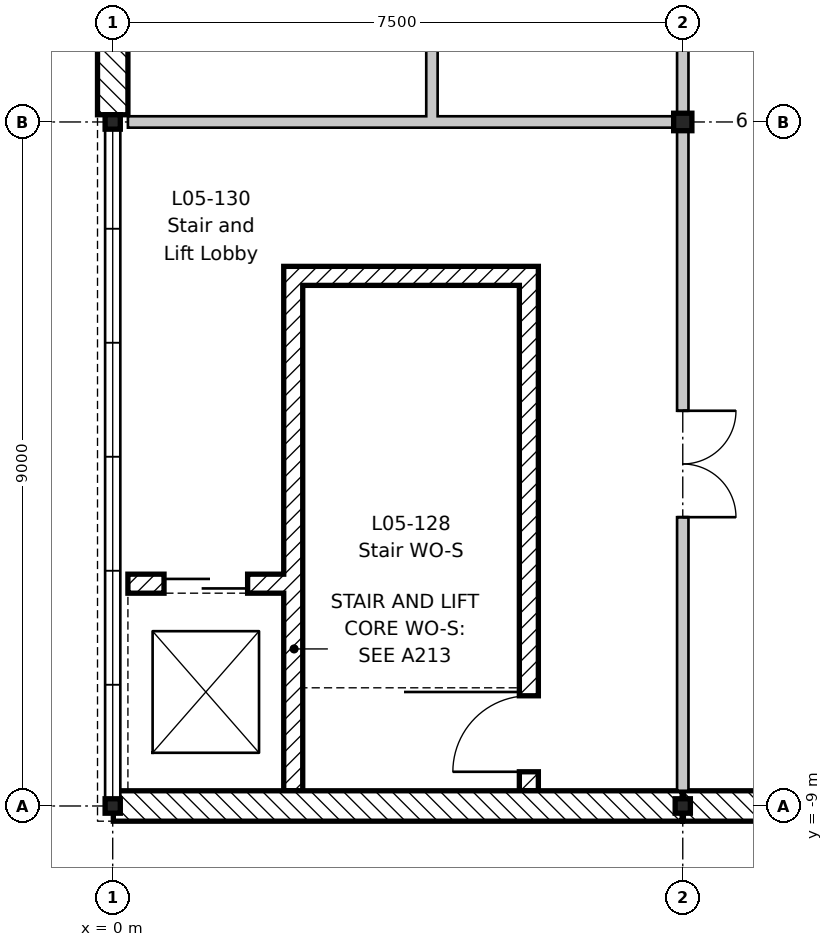
"""IFC4 building model, lengths in metres.
Left out: names, types, materials, properties, quantities, classifications, styles, units other than length and angle.
Written with IfcOpenShell. Run it as: python <this file> out.ifc"""

import sys

from ifc_helpers import new_model, si_unit, direction, frame, frame_2d, origin, origin_2d, place, context, subcontext, project, spatial, rectangle, i_section, extrude, element, fill, save


model = new_model("IFC4")
c1 = context("Model", 3, precision=1e-05, world=origin(), true_north=direction((0.0, 1.0)))
c2 = subcontext(c1, "Body", "Model", "MODEL_VIEW")
j1 = project(units=[si_unit("LENGTHUNIT", "METRE"), si_unit("PLANEANGLEUNIT", "RADIAN")], contexts=[c1])
p1 = place(None, origin())
s1 = spatial("IfcSite", under=j1, at=p1, CompositionType="ELEMENT")
p2 = place(p1, origin())
s2 = spatial("IfcBuilding", under=s1, at=p2, CompositionType="ELEMENT")
p3 = place(p2, frame((0.0, 0.0, 22.8)))
s3 = spatial("IfcBuildingStorey", under=s2, at=p3, CompositionType="ELEMENT", Elevation=22.8)
for number, where, z_axis, x_axis in (
    (1, (0.0, -9.0, -0.2), (0.0, 0.0, 1.0), (1.0, 0.0, 0.0)),
    (2, (0.0, 0.0, -0.2), (0.0, 0.0, 1.0), (1.0, 0.0, 0.0)),
    (3, (7.5, -9.0, -0.2), (0.0, 0.0, 1.0), (1.0, 0.0, 0.0)),
):
    element("IfcColumn", number, at=place(p3, frame(where, z_axis=z_axis, x_axis=x_axis)), inside=s3, PredefinedType="COLUMN", context=c2, shape_type="SweptSolid", body=[
        extrude(i_section(OverallWidth=0.2, OverallDepth=0.19, WebThickness=0.007, FlangeThickness=0.01, FilletRadius=0.018, at=origin_2d()), origin(), (0.0, 0.0, 1.0), 4.15),
    ])
p4 = place(p3, frame((7.5, 0.0, -0.2), z_axis=(0.0, 0.0, 1.0), x_axis=(1.0, 0.0, 0.0)))
e4 = element("IfcColumn", 4, at=p4, inside=s3, PredefinedType="COLUMN", context=c2, shape_type="SweptSolid", body=[
    extrude(i_section(OverallWidth=0.24, OverallDepth=0.23, WebThickness=0.008, FlangeThickness=0.012, FilletRadius=0.021, at=origin_2d()), origin(), (0.0, 0.0, 1.0), 4.15),
])
p5 = place(p3, frame((2.375, -8.8, 0.0), z_axis=(0.0, 0.0, 1.0), x_axis=(0.0, 1.0, 0.0)))
e5 = element("IfcWall", 5, at=p5, inside=s3, PredefinedType="SHEAR", context=c2, shape_type="SweptSolid", body=[
    extrude(rectangle(XDim=6.9, YDim=0.25, at=frame_2d((3.45, 0.0))), origin(), (0.0, 0.0, 1.0), 3.95),
])
p6 = place(p3, frame((5.475, -8.8, 0.0), z_axis=(0.0, 0.0, 1.0), x_axis=(0.0, 1.0, 0.0)))
e6 = element("IfcWall", 6, at=p6, inside=s3, PredefinedType="SHEAR", context=c2, shape_type="SweptSolid", body=[
    extrude(rectangle(XDim=6.9, YDim=0.25, at=frame_2d((3.45, 0.0))), origin(), (0.0, 0.0, 1.0), 3.95),
])
p7 = place(p6, frame((0.25, 0.0, 0.0)))
e7 = element("IfcOpeningElement", 7, at=p7, cuts=e6, PredefinedType="OPENING", context=c2, shape_type="SweptSolid", body=[
    extrude(rectangle(XDim=1.0, YDim=2.1, at=frame_2d((0.5, 1.05))), frame((0.0, 0.135, 0.0), z_axis=(0.0, -1.0, 0.0), x_axis=(1.0, 0.0, 0.0)), (0.0, 0.0, 1.0), 0.27),
])
p8 = place(p3, frame((2.5, -2.025, 0.0), z_axis=(0.0, 0.0, 1.0), x_axis=(1.0, 0.0, 0.0)))
e8 = element("IfcWall", 8, at=p8, inside=s3, PredefinedType="SHEAR", context=c2, shape_type="SweptSolid", body=[
    extrude(rectangle(XDim=2.85, YDim=0.25, at=frame_2d((1.425, 0.0))), origin(), (0.0, 0.0, 1.0), 3.95),
])
p9 = place(p3, frame((0.2, -6.075, 0.0), z_axis=(0.0, 0.0, 1.0), x_axis=(1.0, 0.0, 0.0)))
e9 = element("IfcWall", 9, at=p9, inside=s3, PredefinedType="SHEAR", context=c2, shape_type="SweptSolid", body=[
    extrude(rectangle(XDim=2.05, YDim=0.25, at=frame_2d((1.025, 0.0))), origin(), (0.0, 0.0, 1.0), 3.95),
])
p10 = place(p9, frame((0.475, 0.0, 0.0)))
e10 = element("IfcOpeningElement", 10, at=p10, cuts=e9, PredefinedType="OPENING", context=c2, shape_type="SweptSolid", body=[
    extrude(rectangle(XDim=1.1, YDim=2.1, at=frame_2d((0.55, 1.05))), frame((0.0, 0.135, 0.0), z_axis=(0.0, -1.0, 0.0), x_axis=(1.0, 0.0, 0.0)), (0.0, 0.0, 1.0), 0.27),
])
p11 = place(p3, frame((0.0, 0.095, 0.0), z_axis=(0.0, 0.0, 1.0), x_axis=(0.0, 1.0, 0.0)))
e11 = element("IfcWall", 11, at=p11, inside=s3, PredefinedType="STANDARD", context=c2, shape_type="SweptSolid", body=[
    extrude(rectangle(XDim=8.81, YDim=0.4, at=frame_2d((4.405, 0.0))), origin(), (0.0, 0.0, 1.0), 3.55),
])
p12 = place(p11, frame((1.855, 0.0, 1.5)))
e12 = element("IfcOpeningElement", 12, at=p12, cuts=e11, PredefinedType="OPENING", context=c2, shape_type="SweptSolid", body=[
    extrude(rectangle(XDim=0.6, YDim=1.2, at=frame_2d((0.3, 0.6))), frame((0.0, 0.21, 0.0), z_axis=(0.0, -1.0, 0.0), x_axis=(1.0, 0.0, 0.0)), (0.0, 0.0, 1.0), 0.42),
])
p13 = place(p11, frame((3.355, 0.0, 1.5)))
e13 = element("IfcOpeningElement", 13, at=p13, cuts=e11, PredefinedType="OPENING", context=c2, shape_type="SweptSolid", body=[
    extrude(rectangle(XDim=0.6, YDim=1.2, at=frame_2d((0.3, 0.6))), frame((0.0, 0.21, 0.0), z_axis=(0.0, -1.0, 0.0), x_axis=(1.0, 0.0, 0.0)), (0.0, 0.0, 1.0), 0.42),
])
p14 = place(p11, frame((4.855, 0.0, 1.5)))
e14 = element("IfcOpeningElement", 14, at=p14, cuts=e11, PredefinedType="OPENING", context=c2, shape_type="SweptSolid", body=[
    extrude(rectangle(XDim=0.6, YDim=1.2, at=frame_2d((0.3, 0.6))), frame((0.0, 0.21, 0.0), z_axis=(0.0, -1.0, 0.0), x_axis=(1.0, 0.0, 0.0)), (0.0, 0.0, 1.0), 0.42),
])
p15 = place(p11, frame((6.355, 0.0, 1.5)))
e15 = element("IfcOpeningElement", 15, at=p15, cuts=e11, PredefinedType="OPENING", context=c2, shape_type="SweptSolid", body=[
    extrude(rectangle(XDim=0.6, YDim=1.2, at=frame_2d((0.3, 0.6))), frame((0.0, 0.21, 0.0), z_axis=(0.0, -1.0, 0.0), x_axis=(1.0, 0.0, 0.0)), (0.0, 0.0, 1.0), 0.42),
])
p16 = place(p3, frame((7.492, -9.0, 0.0), z_axis=(0.0, 0.0, 1.0), x_axis=(-1.0, 0.0, 0.0)))
e16 = element("IfcWall", 16, at=p16, inside=s3, PredefinedType="STANDARD", context=c2, shape_type="SweptSolid", body=[
    extrude(rectangle(XDim=7.483, YDim=0.4, at=frame_2d((3.742, 0.0))), origin(), (0.0, 0.0, 1.0), 3.62),
])
p17 = place(p3, frame((10.492, -9.0, 0.0), z_axis=(0.0, 0.0, 1.0), x_axis=(-1.0, 0.0, 0.0)))
e17 = element("IfcWall", 17, at=p17, inside=s3, PredefinedType="STANDARD", context=c2, shape_type="SweptSolid", body=[
    extrude(rectangle(XDim=2.983, YDim=0.4, at=frame_2d((1.492, 0.0))), origin(), (0.0, 0.0, 1.0), 3.75),
])
p18 = place(p3, frame((0.2, 0.0, 0.0), z_axis=(0.0, 0.0, 1.0), x_axis=(1.0, 0.0, 0.0)))
e18 = element("IfcWall", 18, at=p18, inside=s3, PredefinedType="PARTITIONING", context=c2, shape_type="SweptSolid", body=[
    extrude(rectangle(XDim=7.225, YDim=0.15, at=frame_2d((3.613, 0.0))), origin(), (0.0, 0.0, 1.0), 3.6),
])
p19 = place(p3, frame((7.5, -8.8, 0.0), z_axis=(0.0, 0.0, 1.0), x_axis=(0.0, 1.0, 0.0)))
e19 = element("IfcWall", 19, at=p19, inside=s3, PredefinedType="PARTITIONING", context=c2, shape_type="SweptSolid", body=[
    extrude(rectangle(XDim=79.3, YDim=0.15, at=frame_2d((39.65, 0.0))), origin(), (0.0, 0.0, 1.0), 3.43),
])
p20 = place(p19, frame((18.8, 0.0, 0.0)))
e20 = element("IfcOpeningElement", 20, at=p20, cuts=e19, PredefinedType="OPENING", context=c2, shape_type="SweptSolid", body=[
    extrude(rectangle(XDim=1.0, YDim=2.1, at=frame_2d((0.5, 1.05))), frame((0.0, 0.085, 0.0), z_axis=(0.0, -1.0, 0.0), x_axis=(1.0, 0.0, 0.0)), (0.0, 0.0, 1.0), 0.17),
])
p21 = place(p19, frame((23.3, 0.0, 0.0)))
e21 = element("IfcOpeningElement", 21, at=p21, cuts=e19, PredefinedType="OPENING", context=c2, shape_type="SweptSolid", body=[
    extrude(rectangle(XDim=1.0, YDim=2.1, at=frame_2d((0.5, 1.05))), frame((0.0, 0.085, 0.0), z_axis=(0.0, -1.0, 0.0), x_axis=(1.0, 0.0, 0.0)), (0.0, 0.0, 1.0), 0.17),
])
p22 = place(p19, frame((27.8, 0.0, 0.0)))
e22 = element("IfcOpeningElement", 22, at=p22, cuts=e19, PredefinedType="OPENING", context=c2, shape_type="SweptSolid", body=[
    extrude(rectangle(XDim=1.0, YDim=2.1, at=frame_2d((0.5, 1.05))), frame((0.0, 0.085, 0.0), z_axis=(0.0, -1.0, 0.0), x_axis=(1.0, 0.0, 0.0)), (0.0, 0.0, 1.0), 0.17),
])
p23 = place(p19, frame((32.3, 0.0, 0.0)))
e23 = element("IfcOpeningElement", 23, at=p23, cuts=e19, PredefinedType="OPENING", context=c2, shape_type="SweptSolid", body=[
    extrude(rectangle(XDim=1.0, YDim=2.1, at=frame_2d((0.5, 1.05))), frame((0.0, 0.085, 0.0), z_axis=(0.0, -1.0, 0.0), x_axis=(1.0, 0.0, 0.0)), (0.0, 0.0, 1.0), 0.17),
])
p24 = place(p19, frame((45.8, 0.0, 0.0)))
e24 = element("IfcOpeningElement", 24, at=p24, cuts=e19, PredefinedType="OPENING", context=c2, shape_type="SweptSolid", body=[
    extrude(rectangle(XDim=1.0, YDim=2.1, at=frame_2d((0.5, 1.05))), frame((0.0, 0.085, 0.0), z_axis=(0.0, -1.0, 0.0), x_axis=(1.0, 0.0, 0.0)), (0.0, 0.0, 1.0), 0.17),
])
p25 = place(p19, frame((48.8, 0.0, 0.0)))
e25 = element("IfcOpeningElement", 25, at=p25, cuts=e19, PredefinedType="OPENING", context=c2, shape_type="SweptSolid", body=[
    extrude(rectangle(XDim=1.0, YDim=2.1, at=frame_2d((0.5, 1.05))), frame((0.0, 0.085, 0.0), z_axis=(0.0, -1.0, 0.0), x_axis=(1.0, 0.0, 0.0)), (0.0, 0.0, 1.0), 0.17),
])
p26 = place(p19, frame((54.55, 0.0, 0.0)))
e26 = element("IfcOpeningElement", 26, at=p26, cuts=e19, PredefinedType="OPENING", context=c2, shape_type="SweptSolid", body=[
    extrude(rectangle(XDim=1.0, YDim=2.1, at=frame_2d((0.5, 1.05))), frame((0.0, 0.085, 0.0), z_axis=(0.0, -1.0, 0.0), x_axis=(1.0, 0.0, 0.0)), (0.0, 0.0, 1.0), 0.17),
])
p27 = place(p19, frame((57.8, 0.0, 0.0)))
e27 = element("IfcOpeningElement", 27, at=p27, cuts=e19, PredefinedType="OPENING", context=c2, shape_type="SweptSolid", body=[
    extrude(rectangle(XDim=1.0, YDim=2.1, at=frame_2d((0.5, 1.05))), frame((0.0, 0.085, 0.0), z_axis=(0.0, -1.0, 0.0), x_axis=(1.0, 0.0, 0.0)), (0.0, 0.0, 1.0), 0.17),
])
p28 = place(p19, frame((60.8, 0.0, 0.0)))
e28 = element("IfcOpeningElement", 28, at=p28, cuts=e19, PredefinedType="OPENING", context=c2, shape_type="SweptSolid", body=[
    extrude(rectangle(XDim=1.0, YDim=2.1, at=frame_2d((0.5, 1.05))), frame((0.0, 0.085, 0.0), z_axis=(0.0, -1.0, 0.0), x_axis=(1.0, 0.0, 0.0)), (0.0, 0.0, 1.0), 0.17),
])
p29 = place(p19, frame((12.6, 0.0, 0.0)))
e29 = element("IfcOpeningElement", 29, at=p29, cuts=e19, PredefinedType="OPENING", context=c2, shape_type="SweptSolid", body=[
    extrude(rectangle(XDim=1.4, YDim=2.1, at=frame_2d((0.7, 1.05))), frame((0.0, 0.085, 0.0), z_axis=(0.0, -1.0, 0.0), x_axis=(1.0, 0.0, 0.0)), (0.0, 0.0, 1.0), 0.17),
])
p30 = place(p19, frame((3.6, 0.0, 0.0)))
e30 = element("IfcOpeningElement", 30, at=p30, cuts=e19, PredefinedType="OPENING", context=c2, shape_type="SweptSolid", body=[
    extrude(rectangle(XDim=1.4, YDim=2.1, at=frame_2d((0.7, 1.05))), frame((0.0, 0.085, 0.0), z_axis=(0.0, -1.0, 0.0), x_axis=(1.0, 0.0, 0.0)), (0.0, 0.0, 1.0), 0.17),
])
p31 = place(p19, frame((63.55, 0.0, 0.0)))
e31 = element("IfcOpeningElement", 31, at=p31, cuts=e19, PredefinedType="OPENING", context=c2, shape_type="SweptSolid", body=[
    extrude(rectangle(XDim=1.4, YDim=2.1, at=frame_2d((0.7, 1.05))), frame((0.0, 0.085, 0.0), z_axis=(0.0, -1.0, 0.0), x_axis=(1.0, 0.0, 0.0)), (0.0, 0.0, 1.0), 0.17),
])
p32 = place(p19, frame((69.6, 0.0, 0.0)))
e32 = element("IfcOpeningElement", 32, at=p32, cuts=e19, PredefinedType="OPENING", context=c2, shape_type="SweptSolid", body=[
    extrude(rectangle(XDim=1.4, YDim=2.1, at=frame_2d((0.7, 1.05))), frame((0.0, 0.085, 0.0), z_axis=(0.0, -1.0, 0.0), x_axis=(1.0, 0.0, 0.0)), (0.0, 0.0, 1.0), 0.17),
])
p33 = place(p19, frame((42.85, 0.0, 0.0)))
e33 = element("IfcOpeningElement", 33, at=p33, cuts=e19, PredefinedType="OPENING", context=c2, shape_type="SweptSolid", body=[
    extrude(rectangle(XDim=1.0, YDim=2.1, at=frame_2d((0.5, 1.05))), frame((0.0, 0.085, 0.0), z_axis=(0.0, -1.0, 0.0), x_axis=(1.0, 0.0, 0.0)), (0.0, 0.0, 1.0), 0.17),
])
p34 = place(p19, frame((36.55, 0.0, 0.0)))
e34 = element("IfcOpeningElement", 34, at=p34, cuts=e19, PredefinedType="OPENING", context=c2, shape_type="SweptSolid", body=[
    extrude(rectangle(XDim=1.4, YDim=2.1, at=frame_2d((0.7, 1.05))), frame((0.0, 0.085, 0.0), z_axis=(0.0, -1.0, 0.0), x_axis=(1.0, 0.0, 0.0)), (0.0, 0.0, 1.0), 0.17),
])
p35 = place(p19, frame((72.8, 0.0, 0.0)))
e35 = element("IfcOpeningElement", 35, at=p35, cuts=e19, PredefinedType="OPENING", context=c2, shape_type="SweptSolid", body=[
    extrude(rectangle(XDim=1.0, YDim=2.1, at=frame_2d((0.5, 1.05))), frame((0.0, 0.085, 0.0), z_axis=(0.0, -1.0, 0.0), x_axis=(1.0, 0.0, 0.0)), (0.0, 0.0, 1.0), 0.17),
])
p36 = place(p3, frame((4.2, 0.075, 0.0), z_axis=(0.0, 0.0, 1.0), x_axis=(0.0, 1.0, 0.0)))
e36 = element("IfcWall", 36, at=p36, inside=s3, PredefinedType="PARTITIONING", context=c2, shape_type="SweptSolid", body=[
    extrude(rectangle(XDim=8.85, YDim=0.15, at=frame_2d((4.425, 0.0))), origin(), (0.0, 0.0, 1.0), 3.95),
])
p37 = place(p36, frame((0.975, 0.0, 0.0)))
e37 = element("IfcOpeningElement", 37, at=p37, cuts=e36, PredefinedType="OPENING", context=c2, shape_type="SweptSolid", body=[
    extrude(rectangle(XDim=0.9, YDim=2.1, at=frame_2d((0.45, 1.05))), frame((0.0, 0.085, 0.0), z_axis=(0.0, -1.0, 0.0), x_axis=(1.0, 0.0, 0.0)), (0.0, 0.0, 1.0), 0.17),
])
p38 = place(p36, frame((3.975, 0.0, 0.0)))
e38 = element("IfcOpeningElement", 38, at=p38, cuts=e36, PredefinedType="OPENING", context=c2, shape_type="SweptSolid", body=[
    extrude(rectangle(XDim=0.9, YDim=2.1, at=frame_2d((0.45, 1.05))), frame((0.0, 0.085, 0.0), z_axis=(0.0, -1.0, 0.0), x_axis=(1.0, 0.0, 0.0)), (0.0, 0.0, 1.0), 0.17),
])
p39 = place(p36, frame((6.925, 0.0, 0.0)))
e39 = element("IfcOpeningElement", 39, at=p39, cuts=e36, PredefinedType="OPENING", context=c2, shape_type="SweptSolid", body=[
    extrude(rectangle(XDim=1.0, YDim=2.1, at=frame_2d((0.5, 1.05))), frame((0.0, 0.085, 0.0), z_axis=(0.0, -1.0, 0.0), x_axis=(1.0, 0.0, 0.0)), (0.0, 0.0, 1.0), 0.17),
])
p40 = place(p7, origin())
e40 = element("IfcDoor", 40, at=p40, inside=s3, OperationType="SINGLE_SWING_LEFT", PredefinedType="DOOR", context=c2, shape_type="SweptSolid", body=[
    extrude(rectangle(XDim=1.0, YDim=2.1, at=frame_2d((0.5, 1.05))), frame((0.0, 0.025, 0.0), z_axis=(0.0, -1.0, 0.0), x_axis=(1.0, 0.0, 0.0)), (0.0, 0.0, 1.0), 0.05),
])
fill(e7, e40)
p41 = place(p30, frame((1.4, 0.0, 0.0), z_axis=(0.0, 0.0, 1.0), x_axis=(-1.0, 0.0, 0.0)))
e41 = element("IfcDoor", 41, at=p41, inside=s3, OperationType="DOUBLE_DOOR_SINGLE_SWING", PredefinedType="DOOR", context=c2, shape_type="SweptSolid", body=[
    extrude(rectangle(XDim=1.4, YDim=2.1, at=frame_2d((0.7, 1.05))), frame((0.0, 0.025, 0.0), z_axis=(0.0, -1.0, 0.0), x_axis=(1.0, 0.0, 0.0)), (0.0, 0.0, 1.0), 0.05),
])
fill(e30, e41)
p42 = place(p10, origin())
e42 = element("IfcDoor", 42, at=p42, inside=s3, OperationType="SLIDING_TO_LEFT", PredefinedType="DOOR", context=c2, shape_type="SweptSolid", body=[
    extrude(rectangle(XDim=1.1, YDim=2.1, at=frame_2d((0.55, 1.05))), frame((0.0, 0.025, 0.0), z_axis=(0.0, -1.0, 0.0), x_axis=(1.0, 0.0, 0.0)), (0.0, 0.0, 1.0), 0.05),
])
fill(e10, e42)
save(model, sys.argv[1])
